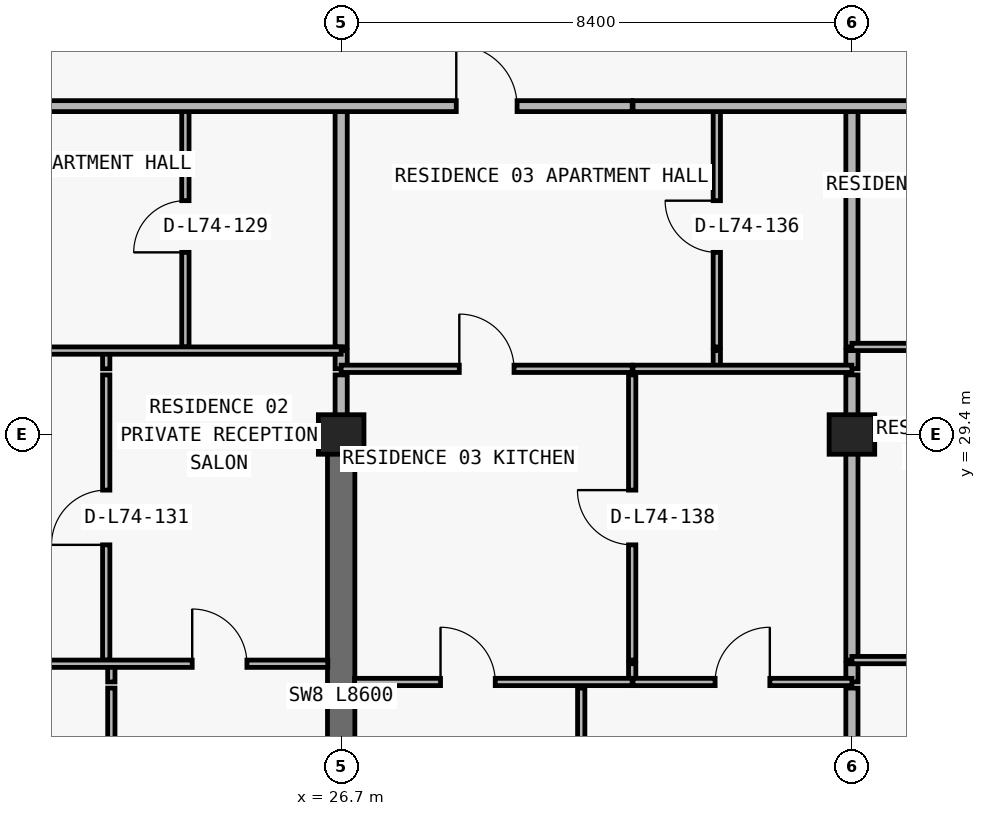
"""IFC4 building model, lengths in metres.
Left out: names, types, materials, properties, quantities, classifications, styles, units other than length and angle.
Written with IfcOpenShell. Run it as: python <this file> out.ifc"""

import sys

from ifc_helpers import new_model, si_unit, direction, frame, frame_2d, origin, origin_2d, place, context, subcontext, project, spatial, rectangle, extrude, element, fill, save


model = new_model("IFC4")
c1 = context("Model", 3, precision=1e-05, world=origin(), true_north=direction((0.0, 1.0)))
c2 = subcontext(c1, "Body", "Model", "MODEL_VIEW")
j1 = project(units=[si_unit("LENGTHUNIT", "METRE"), si_unit("PLANEANGLEUNIT", "RADIAN")], contexts=[c1])
p1 = place(None, origin())
s1 = spatial("IfcSite", under=j1, at=p1, CompositionType="ELEMENT")
p2 = place(p1, origin())
s2 = spatial("IfcBuilding", under=s1, at=p2, CompositionType="ELEMENT")
p3 = place(p2, frame((0.0, 0.0, 262.8)))
s3 = spatial("IfcBuildingStorey", under=s2, at=p3, CompositionType="ELEMENT", Elevation=262.8)
for number, where, z_axis, x_axis in (
    (1, (26.7, 29.4, 0.0), (0.0, 0.0, 1.0), (1.0, 0.0, 0.0)),
    (2, (35.1, 29.4, 0.0), (0.0, 0.0, 1.0), (1.0, 0.0, 0.0)),
):
    element("IfcColumn", number, at=place(p3, frame(where, z_axis=z_axis, x_axis=x_axis)), inside=s3, PredefinedType="COLUMN", context=c2, shape_type="SweptSolid", body=[
        extrude(rectangle(XDim=0.75, YDim=0.65, at=origin_2d()), origin(), (0.0, 0.0, 1.0), 3.05),
    ])
p4 = place(p3, frame((26.7, 20.8, 0.0), z_axis=(0.0, 0.0, 1.0), x_axis=(0.0, 1.0, 0.0)))
e3 = element("IfcWall", 3, at=p4, inside=s3, PredefinedType="SHEAR", context=c2, shape_type="SweptSolid", body=[
    extrude(rectangle(XDim=8.6, YDim=0.45, at=frame_2d((4.3, 0.0))), origin(), (0.0, 0.0, 1.0), 3.05),
])
p5 = place(p3, frame((22.836, 25.69, 0.0), z_axis=(0.0, 0.0, 1.0), x_axis=(0.0, 1.0, 0.0)))
e4 = element("IfcWall", 4, at=p5, inside=s3, PredefinedType="PARTITIONING", context=c2, shape_type="SweptSolid", body=[
    extrude(rectangle(XDim=4.69, YDim=0.12, at=frame_2d((2.345, 0.0))), origin(), (0.0, 0.0, 1.0), 3.05),
])
p6 = place(p5, frame((1.895, 0.0, 0.0)))
e5 = element("IfcOpeningElement", 5, at=p6, cuts=e4, PredefinedType="OPENING", context=c2, shape_type="SweptSolid", body=[
    extrude(rectangle(XDim=0.9, YDim=2.15, at=frame_2d((0.45, 1.075))), frame((0.0, 0.07, 0.0), z_axis=(0.0, -1.0, 0.0), x_axis=(1.0, 0.0, 0.0)), (0.0, 0.0, 1.0), 0.14),
])
p7 = place(p3, frame((22.836, 30.48, 0.0), z_axis=(0.0, 0.0, 1.0), x_axis=(0.0, 1.0, 0.0)))
e6 = element("IfcWall", 6, at=p7, inside=s3, PredefinedType="PARTITIONING", context=c2, shape_type="SweptSolid", body=[
    extrude(rectangle(XDim=0.3, YDim=0.12, at=frame_2d((0.15, 0.0))), origin(), (0.0, 0.0, 1.0), 3.05),
])
p8 = place(p3, frame((22.92, 13.34, 0.0), z_axis=(0.0, 0.0, 1.0), x_axis=(0.0, 1.0, 0.0)))
e7 = element("IfcWall", 7, at=p8, inside=s3, PredefinedType="PARTITIONING", context=c2, shape_type="SweptSolid", body=[
    extrude(rectangle(XDim=11.89, YDim=0.12, at=frame_2d((5.945, 0.0))), origin(), (0.0, 0.0, 1.0), 3.05),
])
p9 = place(p3, frame((22.92, 25.33, 0.0), z_axis=(0.0, 0.0, 1.0), x_axis=(0.0, 1.0, 0.0)))
e8 = element("IfcWall", 8, at=p9, inside=s3, PredefinedType="PARTITIONING", context=c2, shape_type="SweptSolid", body=[
    extrude(rectangle(XDim=0.3, YDim=0.12, at=frame_2d((0.15, 0.0))), origin(), (0.0, 0.0, 1.0), 3.05),
])
p10 = place(p3, frame((24.138, 30.84, 0.0), z_axis=(0.0, 0.0, 1.0), x_axis=(0.0, 1.0, 0.0)))
e9 = element("IfcWall", 9, at=p10, inside=s3, PredefinedType="PARTITIONING", context=c2, shape_type="SweptSolid", body=[
    extrude(rectangle(XDim=3.96, YDim=0.12, at=frame_2d((1.98, 0.0))), origin(), (0.0, 0.0, 1.0), 3.05),
])
p11 = place(p10, frame((1.555, 0.0, 0.0)))
e10 = element("IfcOpeningElement", 10, at=p11, cuts=e9, PredefinedType="OPENING", context=c2, shape_type="SweptSolid", body=[
    extrude(rectangle(XDim=0.85, YDim=2.1, at=frame_2d((0.425, 1.05))), frame((0.0, 0.07, 0.0), z_axis=(0.0, -1.0, 0.0), x_axis=(1.0, 0.0, 0.0)), (0.0, 0.0, 1.0), 0.14),
])
p12 = place(p3, frame((26.7, 29.405, 0.0), z_axis=(0.0, 0.0, 1.0), x_axis=(0.0, 1.0, 0.0)))
e11 = element("IfcWall", 11, at=p12, inside=s3, PredefinedType="PARTITIONING", context=c2, shape_type="SweptSolid", body=[
    extrude(rectangle(XDim=0.975, YDim=0.2, at=frame_2d((0.487, 0.0))), origin(), (0.0, 0.0, 1.0), 2.335),
])
p13 = place(p3, frame((26.7, 30.48, 0.0), z_axis=(0.0, 0.0, 1.0), x_axis=(0.0, 1.0, 0.0)))
e12 = element("IfcWall", 12, at=p13, inside=s3, PredefinedType="PARTITIONING", context=c2, shape_type="SweptSolid", body=[
    extrude(rectangle(XDim=0.3, YDim=0.2, at=frame_2d((0.15, 0.0))), origin(), (0.0, 0.0, 1.0), 2.335),
])
p14 = place(p3, frame((26.7, 30.84, 0.0), z_axis=(0.0, 0.0, 1.0), x_axis=(0.0, 1.0, 0.0)))
e13 = element("IfcWall", 13, at=p14, inside=s3, PredefinedType="PARTITIONING", context=c2, shape_type="SweptSolid", body=[
    extrude(rectangle(XDim=3.96, YDim=0.2, at=frame_2d((1.98, 0.0))), origin(), (0.0, 0.0, 1.0), 2.335),
])
p15 = place(p3, frame((30.648, 13.34, 0.0), z_axis=(0.0, 0.0, 1.0), x_axis=(0.0, 1.0, 0.0)))
e14 = element("IfcWall", 14, at=p15, inside=s3, PredefinedType="PARTITIONING", context=c2, shape_type="SweptSolid", body=[
    extrude(rectangle(XDim=11.89, YDim=0.12, at=frame_2d((5.945, 0.0))), origin(), (0.0, 0.0, 1.0), 3.05),
])
p16 = place(p3, frame((31.486, 25.33, 0.0), z_axis=(0.0, 0.0, 1.0), x_axis=(0.0, 1.0, 0.0)))
e15 = element("IfcWall", 15, at=p16, inside=s3, PredefinedType="PARTITIONING", context=c2, shape_type="SweptSolid", body=[
    extrude(rectangle(XDim=0.3, YDim=0.12, at=frame_2d((0.15, 0.0))), origin(), (0.0, 0.0, 1.0), 3.05),
])
p17 = place(p3, frame((31.486, 25.69, 0.0), z_axis=(0.0, 0.0, 1.0), x_axis=(0.0, 1.0, 0.0)))
e16 = element("IfcWall", 16, at=p17, inside=s3, PredefinedType="PARTITIONING", context=c2, shape_type="SweptSolid", body=[
    extrude(rectangle(XDim=4.69, YDim=0.12, at=frame_2d((2.345, 0.0))), origin(), (0.0, 0.0, 1.0), 3.05),
])
p18 = place(p17, frame((1.895, 0.0, 0.0)))
e17 = element("IfcOpeningElement", 17, at=p18, cuts=e16, PredefinedType="OPENING", context=c2, shape_type="SweptSolid", body=[
    extrude(rectangle(XDim=0.9, YDim=2.15, at=frame_2d((0.45, 1.075))), frame((0.0, 0.07, 0.0), z_axis=(0.0, -1.0, 0.0), x_axis=(1.0, 0.0, 0.0)), (0.0, 0.0, 1.0), 0.14),
])
p19 = place(p3, frame((32.878, 30.48, 0.0), z_axis=(0.0, 0.0, 1.0), x_axis=(0.0, 1.0, 0.0)))
e18 = element("IfcWall", 18, at=p19, inside=s3, PredefinedType="PARTITIONING", context=c2, shape_type="SweptSolid", body=[
    extrude(rectangle(XDim=0.3, YDim=0.12, at=frame_2d((0.15, 0.0))), origin(), (0.0, 0.0, 1.0), 3.05),
])
p20 = place(p3, frame((32.878, 30.84, 0.0), z_axis=(0.0, 0.0, 1.0), x_axis=(0.0, 1.0, 0.0)))
e19 = element("IfcWall", 19, at=p20, inside=s3, PredefinedType="PARTITIONING", context=c2, shape_type="SweptSolid", body=[
    extrude(rectangle(XDim=3.96, YDim=0.12, at=frame_2d((1.98, 0.0))), origin(), (0.0, 0.0, 1.0), 3.05),
])
p21 = place(p20, frame((1.555, 0.0, 0.0)))
e20 = element("IfcOpeningElement", 20, at=p21, cuts=e19, PredefinedType="OPENING", context=c2, shape_type="SweptSolid", body=[
    extrude(rectangle(XDim=0.85, YDim=2.1, at=frame_2d((0.425, 1.05))), frame((0.0, 0.07, 0.0), z_axis=(0.0, -1.0, 0.0), x_axis=(1.0, 0.0, 0.0)), (0.0, 0.0, 1.0), 0.14),
])
p22 = place(p3, frame((35.1, 13.34, 0.0), z_axis=(0.0, 0.0, 1.0), x_axis=(0.0, 1.0, 0.0)))
e21 = element("IfcWall", 21, at=p22, inside=s3, PredefinedType="PARTITIONING", context=c2, shape_type="SweptSolid", body=[
    extrude(rectangle(XDim=11.89, YDim=0.2, at=frame_2d((5.945, 0.0))), origin(), (0.0, 0.0, 1.0), 2.263),
])
p23 = place(p3, frame((35.1, 25.33, 0.0), z_axis=(0.0, 0.0, 1.0), x_axis=(0.0, 1.0, 0.0)))
e22 = element("IfcWall", 22, at=p23, inside=s3, PredefinedType="PARTITIONING", context=c2, shape_type="SweptSolid", body=[
    extrude(rectangle(XDim=0.3, YDim=0.2, at=frame_2d((0.15, 0.0))), origin(), (0.0, 0.0, 1.0), 2.263),
])
p24 = place(p3, frame((35.1, 25.69, 0.0), z_axis=(0.0, 0.0, 1.0), x_axis=(0.0, 1.0, 0.0)))
e23 = element("IfcWall", 23, at=p24, inside=s3, PredefinedType="PARTITIONING", context=c2, shape_type="SweptSolid", body=[
    extrude(rectangle(XDim=4.69, YDim=0.2, at=frame_2d((2.345, 0.0))), origin(), (0.0, 0.0, 1.0), 2.263),
])
p25 = place(p3, frame((35.1, 30.48, 0.0), z_axis=(0.0, 0.0, 1.0), x_axis=(0.0, 1.0, 0.0)))
e24 = element("IfcWall", 24, at=p25, inside=s3, PredefinedType="PARTITIONING", context=c2, shape_type="SweptSolid", body=[
    extrude(rectangle(XDim=0.3, YDim=0.2, at=frame_2d((0.15, 0.0))), origin(), (0.0, 0.0, 1.0), 2.263),
])
p26 = place(p3, frame((35.1, 30.84, 0.0), z_axis=(0.0, 0.0, 1.0), x_axis=(0.0, 1.0, 0.0)))
e25 = element("IfcWall", 25, at=p26, inside=s3, PredefinedType="PARTITIONING", context=c2, shape_type="SweptSolid", body=[
    extrude(rectangle(XDim=3.96, YDim=0.2, at=frame_2d((1.98, 0.0))), origin(), (0.0, 0.0, 1.0), 2.263),
])
p27 = place(p3, frame((26.92, 25.33, 0.0), z_axis=(0.0, 0.0, 1.0), x_axis=(1.0, 0.0, 0.0)))
e26 = element("IfcWall", 26, at=p27, inside=s3, PredefinedType="PARTITIONING", context=c2, shape_type="SweptSolid", body=[
    extrude(rectangle(XDim=4.566, YDim=0.12, at=frame_2d((2.283, 0.0))), origin(), (0.0, 0.0, 1.0), 3.05),
])
p28 = place(p27, frame((1.414, 0.0, 0.0)))
e27 = element("IfcOpeningElement", 27, at=p28, cuts=e26, PredefinedType="OPENING", context=c2, shape_type="SweptSolid", body=[
    extrude(rectangle(XDim=0.9, YDim=2.15, at=frame_2d((0.45, 1.075))), frame((0.0, 0.07, 0.0), z_axis=(0.0, -1.0, 0.0), x_axis=(1.0, 0.0, 0.0)), (0.0, 0.0, 1.0), 0.14),
])
p29 = place(p3, frame((31.5, 25.33, 0.0), z_axis=(0.0, 0.0, 1.0), x_axis=(1.0, 0.0, 0.0)))
e28 = element("IfcWall", 28, at=p29, inside=s3, PredefinedType="PARTITIONING", context=c2, shape_type="SweptSolid", body=[
    extrude(rectangle(XDim=3.6, YDim=0.12, at=frame_2d((1.8, 0.0))), origin(), (0.0, 0.0, 1.0), 3.05),
])
p30 = place(p29, frame((1.35, 0.0, 0.0)))
e29 = element("IfcOpeningElement", 29, at=p30, cuts=e28, PredefinedType="OPENING", context=c2, shape_type="SweptSolid", body=[
    extrude(rectangle(XDim=0.9, YDim=2.15, at=frame_2d((0.45, 1.075))), frame((0.0, 0.07, 0.0), z_axis=(0.0, -1.0, 0.0), x_axis=(1.0, 0.0, 0.0)), (0.0, 0.0, 1.0), 0.14),
])
p31 = place(p3, frame((18.3, 25.63, 0.0), z_axis=(0.0, 0.0, 1.0), x_axis=(1.0, 0.0, 0.0)))
e30 = element("IfcWall", 30, at=p31, inside=s3, PredefinedType="PARTITIONING", context=c2, shape_type="SweptSolid", body=[
    extrude(rectangle(XDim=8.18, YDim=0.12, at=frame_2d((4.09, 0.0))), origin(), (0.0, 0.0, 1.0), 3.05),
])
p32 = place(p31, frame((1.818, 0.0, 0.0)))
e31 = element("IfcOpeningElement", 31, at=p32, cuts=e30, PredefinedType="OPENING", context=c2, shape_type="SweptSolid", body=[
    extrude(rectangle(XDim=0.9, YDim=2.15, at=frame_2d((0.45, 1.075))), frame((0.0, 0.07, 0.0), z_axis=(0.0, -1.0, 0.0), x_axis=(1.0, 0.0, 0.0)), (0.0, 0.0, 1.0), 0.14),
])
p33 = place(p31, frame((5.95, 0.0, 0.0)))
e32 = element("IfcOpeningElement", 32, at=p33, cuts=e30, PredefinedType="OPENING", context=c2, shape_type="SweptSolid", body=[
    extrude(rectangle(XDim=0.9, YDim=2.15, at=frame_2d((0.45, 1.075))), frame((0.0, 0.07, 0.0), z_axis=(0.0, -1.0, 0.0), x_axis=(1.0, 0.0, 0.0)), (0.0, 0.0, 1.0), 0.14),
])
p34 = place(p3, frame((35.1, 25.69, 0.0), z_axis=(0.0, 0.0, 1.0), x_axis=(1.0, 0.0, 0.0)))
e33 = element("IfcWall", 33, at=p34, inside=s3, PredefinedType="PARTITIONING", context=c2, shape_type="SweptSolid", body=[
    extrude(rectangle(XDim=7.6, YDim=0.12, at=frame_2d((3.8, 0.0))), origin(), (0.0, 0.0, 1.0), 3.05),
])
p35 = place(p34, frame((1.477, 0.0, 0.0)))
e34 = element("IfcOpeningElement", 34, at=p35, cuts=e33, PredefinedType="OPENING", context=c2, shape_type="SweptSolid", body=[
    extrude(rectangle(XDim=0.9, YDim=2.15, at=frame_2d((0.45, 1.075))), frame((0.0, 0.07, 0.0), z_axis=(0.0, -1.0, 0.0), x_axis=(1.0, 0.0, 0.0)), (0.0, 0.0, 1.0), 0.14),
])
p36 = place(p34, frame((5.44, 0.0, 0.0)))
e35 = element("IfcOpeningElement", 35, at=p36, cuts=e33, PredefinedType="OPENING", context=c2, shape_type="SweptSolid", body=[
    extrude(rectangle(XDim=0.9, YDim=2.15, at=frame_2d((0.45, 1.075))), frame((0.0, 0.07, 0.0), z_axis=(0.0, -1.0, 0.0), x_axis=(1.0, 0.0, 0.0)), (0.0, 0.0, 1.0), 0.14),
])
p37 = place(p3, frame((26.7, 30.48, 0.0), z_axis=(0.0, 0.0, 1.0), x_axis=(1.0, 0.0, 0.0)))
e36 = element("IfcWall", 36, at=p37, inside=s3, PredefinedType="PARTITIONING", context=c2, shape_type="SweptSolid", body=[
    extrude(rectangle(XDim=4.786, YDim=0.12, at=frame_2d((2.393, 0.0))), origin(), (0.0, 0.0, 1.0), 3.05),
])
p38 = place(p37, frame((1.943, 0.0, 0.0)))
e37 = element("IfcOpeningElement", 37, at=p38, cuts=e36, PredefinedType="OPENING", context=c2, shape_type="SweptSolid", body=[
    extrude(rectangle(XDim=0.9, YDim=2.15, at=frame_2d((0.45, 1.075))), frame((0.0, 0.07, 0.0), z_axis=(0.0, -1.0, 0.0), x_axis=(1.0, 0.0, 0.0)), (0.0, 0.0, 1.0), 0.14),
])
p39 = place(p3, frame((31.5, 30.48, 0.0), z_axis=(0.0, 0.0, 1.0), x_axis=(1.0, 0.0, 0.0)))
e38 = element("IfcWall", 38, at=p39, inside=s3, PredefinedType="PARTITIONING", context=c2, shape_type="SweptSolid", body=[
    extrude(rectangle(XDim=3.6, YDim=0.12, at=frame_2d((1.8, 0.0))), origin(), (0.0, 0.0, 1.0), 3.05),
])
p40 = place(p3, frame((18.3, 30.78, 0.0), z_axis=(0.0, 0.0, 1.0), x_axis=(1.0, 0.0, 0.0)))
e39 = element("IfcWall", 39, at=p40, inside=s3, PredefinedType="PARTITIONING", context=c2, shape_type="SweptSolid", body=[
    extrude(rectangle(XDim=8.4, YDim=0.12, at=frame_2d((4.2, 0.0))), origin(), (0.0, 0.0, 1.0), 3.05),
])
p41 = place(p40, frame((1.818, 0.0, 0.0)))
e40 = element("IfcOpeningElement", 40, at=p41, cuts=e39, PredefinedType="OPENING", context=c2, shape_type="SweptSolid", body=[
    extrude(rectangle(XDim=0.9, YDim=2.15, at=frame_2d((0.45, 1.075))), frame((0.0, 0.07, 0.0), z_axis=(0.0, -1.0, 0.0), x_axis=(1.0, 0.0, 0.0)), (0.0, 0.0, 1.0), 0.14),
])
p42 = place(p3, frame((35.1, 30.84, 0.0), z_axis=(0.0, 0.0, 1.0), x_axis=(1.0, 0.0, 0.0)))
e41 = element("IfcWall", 41, at=p42, inside=s3, PredefinedType="PARTITIONING", context=c2, shape_type="SweptSolid", body=[
    extrude(rectangle(XDim=7.6, YDim=0.12, at=frame_2d((3.8, 0.0))), origin(), (0.0, 0.0, 1.0), 3.05),
])
p43 = place(p42, frame((1.477, 0.0, 0.0)))
e42 = element("IfcOpeningElement", 42, at=p43, cuts=e41, PredefinedType="OPENING", context=c2, shape_type="SweptSolid", body=[
    extrude(rectangle(XDim=0.9, YDim=2.15, at=frame_2d((0.45, 1.075))), frame((0.0, 0.07, 0.0), z_axis=(0.0, -1.0, 0.0), x_axis=(1.0, 0.0, 0.0)), (0.0, 0.0, 1.0), 0.14),
])
p44 = place(p3, frame((15.203, 34.8, 0.0), z_axis=(0.0, 0.0, 1.0), x_axis=(1.0, 0.0, 0.0)))
e43 = element("IfcWall", 43, at=p44, inside=s3, PredefinedType="PARTITIONING", context=c2, shape_type="SweptSolid", body=[
    extrude(rectangle(XDim=16.283, YDim=0.18, at=frame_2d((8.142, 0.0))), origin(), (0.0, 0.0, 1.0), 3.05),
])
p45 = place(p44, frame((5.516, 0.0, 0.0)))
e44 = element("IfcOpeningElement", 44, at=p45, cuts=e43, PredefinedType="OPENING", context=c2, shape_type="SweptSolid", body=[
    extrude(rectangle(XDim=1.0, YDim=2.2, at=frame_2d((0.5, 1.1))), frame((0.0, 0.1, 0.0), z_axis=(0.0, -1.0, 0.0), x_axis=(1.0, 0.0, 0.0)), (0.0, 0.0, 1.0), 0.2),
])
p46 = place(p44, frame((13.39, 0.0, 0.0)))
e45 = element("IfcOpeningElement", 45, at=p46, cuts=e43, PredefinedType="OPENING", context=c2, shape_type="SweptSolid", body=[
    extrude(rectangle(XDim=1.0, YDim=2.2, at=frame_2d((0.5, 1.1))), frame((0.0, 0.1, 0.0), z_axis=(0.0, -1.0, 0.0), x_axis=(1.0, 0.0, 0.0)), (0.0, 0.0, 1.0), 0.2),
])
p47 = place(p3, frame((31.5, 34.8, 0.0), z_axis=(0.0, 0.0, 1.0), x_axis=(1.0, 0.0, 0.0)))
e46 = element("IfcWall", 46, at=p47, inside=s3, PredefinedType="PARTITIONING", context=c2, shape_type="SweptSolid", body=[
    extrude(rectangle(XDim=34.2, YDim=0.18, at=frame_2d((17.1, 0.0))), origin(), (0.0, 0.0, 1.0), 3.05),
])
p48 = place(p47, frame((5.6, 0.0, 0.0)))
e47 = element("IfcOpeningElement", 47, at=p48, cuts=e46, PredefinedType="OPENING", context=c2, shape_type="SweptSolid", body=[
    extrude(rectangle(XDim=1.0, YDim=2.2, at=frame_2d((0.5, 1.1))), frame((0.0, 0.1, 0.0), z_axis=(0.0, -1.0, 0.0), x_axis=(1.0, 0.0, 0.0)), (0.0, 0.0, 1.0), 0.2),
])
p49 = place(p47, frame((13.799, 0.0, 0.0)))
e48 = element("IfcOpeningElement", 48, at=p49, cuts=e46, PredefinedType="OPENING", context=c2, shape_type="SweptSolid", body=[
    extrude(rectangle(XDim=1.0, YDim=2.2, at=frame_2d((0.5, 1.1))), frame((0.0, 0.1, 0.0), z_axis=(0.0, -1.0, 0.0), x_axis=(1.0, 0.0, 0.0)), (0.0, 0.0, 1.0), 0.2),
])
p50 = place(p47, frame((22.483, 0.0, 0.0)))
e49 = element("IfcOpeningElement", 49, at=p50, cuts=e46, PredefinedType="OPENING", context=c2, shape_type="SweptSolid", body=[
    extrude(rectangle(XDim=1.0, YDim=2.2, at=frame_2d((0.5, 1.1))), frame((0.0, 0.1, 0.0), z_axis=(0.0, -1.0, 0.0), x_axis=(1.0, 0.0, 0.0)), (0.0, 0.0, 1.0), 0.2),
])
p51 = place(p11, origin())
e50 = element("IfcDoor", 50, at=p51, inside=s3, OperationType="SINGLE_SWING_LEFT", PredefinedType="DOOR", context=c2, shape_type="SweptSolid", body=[
    extrude(rectangle(XDim=0.85, YDim=2.1, at=frame_2d((0.425, 1.05))), frame((0.0, 0.025, 0.0), z_axis=(0.0, -1.0, 0.0), x_axis=(1.0, 0.0, 0.0)), (0.0, 0.0, 1.0), 0.05),
])
fill(e10, e50)
p52 = place(p6, origin())
e51 = element("IfcDoor", 51, at=p52, inside=s3, OperationType="SINGLE_SWING_LEFT", PredefinedType="DOOR", context=c2, shape_type="SweptSolid", body=[
    extrude(rectangle(XDim=0.9, YDim=2.15, at=frame_2d((0.45, 1.075))), frame((0.0, 0.025, 0.0), z_axis=(0.0, -1.0, 0.0), x_axis=(1.0, 0.0, 0.0)), (0.0, 0.0, 1.0), 0.05),
])
fill(e5, e51)
p53 = place(p33, origin())
e52 = element("IfcDoor", 52, at=p53, inside=s3, OperationType="SINGLE_SWING_LEFT", PredefinedType="DOOR", context=c2, shape_type="SweptSolid", body=[
    extrude(rectangle(XDim=0.9, YDim=2.15, at=frame_2d((0.45, 1.075))), frame((0.0, 0.025, 0.0), z_axis=(0.0, -1.0, 0.0), x_axis=(1.0, 0.0, 0.0)), (0.0, 0.0, 1.0), 0.05),
])
fill(e32, e52)
p54 = place(p46, origin())
e53 = element("IfcDoor", 53, at=p54, inside=s3, OperationType="SINGLE_SWING_LEFT", PredefinedType="DOOR", context=c2, shape_type="SweptSolid", body=[
    extrude(rectangle(XDim=1.0, YDim=2.2, at=frame_2d((0.5, 1.1))), frame((0.0, 0.025, 0.0), z_axis=(0.0, -1.0, 0.0), x_axis=(1.0, 0.0, 0.0)), (0.0, 0.0, 1.0), 0.05),
])
fill(e45, e53)
p55 = place(p21, origin())
e54 = element("IfcDoor", 54, at=p55, inside=s3, OperationType="SINGLE_SWING_RIGHT", PredefinedType="DOOR", context=c2, shape_type="SweptSolid", body=[
    extrude(rectangle(XDim=0.85, YDim=2.1, at=frame_2d((0.425, 1.05))), frame((0.0, 0.025, 0.0), z_axis=(0.0, -1.0, 0.0), x_axis=(1.0, 0.0, 0.0)), (0.0, 0.0, 1.0), 0.05),
])
fill(e20, e54)
p56 = place(p38, origin())
e55 = element("IfcDoor", 55, at=p56, inside=s3, OperationType="SINGLE_SWING_LEFT", PredefinedType="DOOR", context=c2, shape_type="SweptSolid", body=[
    extrude(rectangle(XDim=0.9, YDim=2.15, at=frame_2d((0.45, 1.075))), frame((0.0, 0.025, 0.0), z_axis=(0.0, -1.0, 0.0), x_axis=(1.0, 0.0, 0.0)), (0.0, 0.0, 1.0), 0.05),
])
fill(e37, e55)
p57 = place(p18, origin())
e56 = element("IfcDoor", 56, at=p57, inside=s3, OperationType="SINGLE_SWING_RIGHT", PredefinedType="DOOR", context=c2, shape_type="SweptSolid", body=[
    extrude(rectangle(XDim=0.9, YDim=2.15, at=frame_2d((0.45, 1.075))), frame((0.0, 0.025, 0.0), z_axis=(0.0, -1.0, 0.0), x_axis=(1.0, 0.0, 0.0)), (0.0, 0.0, 1.0), 0.05),
])
fill(e17, e56)
p58 = place(p28, origin())
e57 = element("IfcDoor", 57, at=p58, inside=s3, OperationType="SINGLE_SWING_LEFT", PredefinedType="DOOR", context=c2, shape_type="SweptSolid", body=[
    extrude(rectangle(XDim=0.9, YDim=2.15, at=frame_2d((0.45, 1.075))), frame((0.0, 0.025, 0.0), z_axis=(0.0, -1.0, 0.0), x_axis=(1.0, 0.0, 0.0)), (0.0, 0.0, 1.0), 0.05),
])
fill(e27, e57)
p59 = place(p30, origin())
e58 = element("IfcDoor", 58, at=p59, inside=s3, OperationType="SINGLE_SWING_RIGHT", PredefinedType="DOOR", context=c2, shape_type="SweptSolid", body=[
    extrude(rectangle(XDim=0.9, YDim=2.15, at=frame_2d((0.45, 1.075))), frame((0.0, 0.025, 0.0), z_axis=(0.0, -1.0, 0.0), x_axis=(1.0, 0.0, 0.0)), (0.0, 0.0, 1.0), 0.05),
])
fill(e29, e58)
save(model, sys.argv[1])
